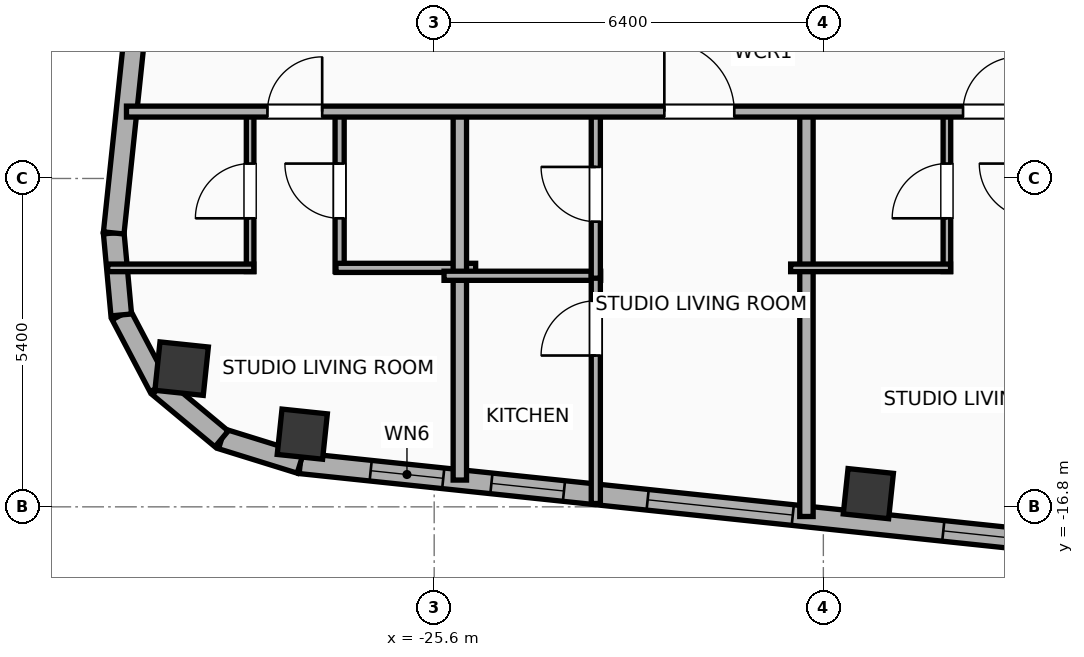
"""IFC4 building model, lengths in metres.
Left out: names, types, materials, properties, quantities, classifications, styles, units other than length and angle.
Written with IfcOpenShell. Run it as: python <this file> out.ifc"""

import sys

from ifc_helpers import new_model, si_unit, direction, frame, frame_2d, origin, origin_2d, place, context, subcontext, project, spatial, rectangle, hollow_rectangle, hollow_circle, extrude, element, fill, save


model = new_model("IFC4")
c1 = context("Model", 3, precision=1e-05, world=origin(), true_north=direction((0.0, 1.0)))
c2 = subcontext(c1, "Body", "Model", "MODEL_VIEW")
j1 = project(units=[si_unit("LENGTHUNIT", "METRE"), si_unit("PLANEANGLEUNIT", "RADIAN")], contexts=[c1])
p1 = place(None, origin())
s1 = spatial("IfcSite", under=j1, at=p1, CompositionType="ELEMENT")
p2 = place(p1, origin())
s2 = spatial("IfcBuilding", under=s1, at=p2, CompositionType="ELEMENT")
p3 = place(p2, frame((0.0, 0.0, 267.8)))
s3 = spatial("IfcBuildingStorey", under=s2, at=p3, CompositionType="ELEMENT", Elevation=267.8)
for number, where, z_axis, x_axis in (
    (1, (-27.769, -15.604, 0.0), (0.0, 0.0, 1.0), (0.995, -0.105, 0.0)),
    (2, (-18.46, -16.583, 0.0), (0.0, 0.0, 1.0), (0.995, -0.105, 0.0)),
):
    element("IfcColumn", number, at=place(p3, frame(where, z_axis=z_axis, x_axis=x_axis)), inside=s3, PredefinedType="COLUMN", context=c2, shape_type="SweptSolid", body=[
        extrude(hollow_rectangle(XDim=0.75, YDim=0.75, WallThickness=0.025, at=origin_2d()), origin(), (0.0, 0.0, 1.0), 3.9),
    ])
p4 = place(p3, frame((-29.753, -14.527, 0.0), z_axis=(0.0, 0.0, 1.0), x_axis=(0.994521895368, -0.104528463268, 0.0)))
e3 = element("IfcColumn", 3, at=p4, inside=s3, PredefinedType="COLUMN", context=c2, shape_type="SweptSolid", body=[
    extrude(hollow_circle(Radius=0.4, WallThickness=0.028, at=origin_2d()), origin(), (0.0, 0.0, 1.0), 3.9),
])
p5 = place(p3, frame((18.708, -20.972, 0.0), z_axis=(0.0, 0.0, 1.0), x_axis=(-0.994521888554, 0.104528528102, 0.0)))
e4 = element("IfcWall", 4, at=p5, inside=s3, PredefinedType="ELEMENTEDWALL", context=c2, shape_type="SweptSolid", body=[
    extrude(rectangle(XDim=46.766, YDim=0.34, at=frame_2d((23.383, 0.0))), origin(), (0.0, 0.0, 1.0), 3.65),
])
p6 = place(p5, frame((23.833, 0.0, 0.75)))
e5 = element("IfcOpeningElement", 5, at=p6, cuts=e4, PredefinedType="OPENING", context=c2, shape_type="SweptSolid", body=[
    extrude(rectangle(XDim=2.4, YDim=2.1, at=frame_2d((1.2, 1.05))), frame((0.0, 0.18, 0.0), z_axis=(0.0, -1.0, 0.0), x_axis=(1.0, 0.0, 0.0)), (0.0, 0.0, 1.0), 0.36),
])
p7 = place(p5, frame((38.622, 0.0, 0.75)))
e6 = element("IfcOpeningElement", 6, at=p7, cuts=e4, PredefinedType="OPENING", context=c2, shape_type="SweptSolid", body=[
    extrude(rectangle(XDim=2.4, YDim=2.1, at=frame_2d((1.2, 1.05))), frame((0.0, 0.18, 0.0), z_axis=(0.0, -1.0, 0.0), x_axis=(1.0, 0.0, 0.0)), (0.0, 0.0, 1.0), 0.36),
])
p8 = place(p5, frame((44.402, 0.0, 0.75)))
e7 = element("IfcOpeningElement", 7, at=p8, cuts=e4, PredefinedType="OPENING", context=c2, shape_type="SweptSolid", body=[
    extrude(rectangle(XDim=1.2, YDim=2.05, at=frame_2d((0.6, 1.025))), frame((0.0, 0.18, 0.0), z_axis=(0.0, -1.0, 0.0), x_axis=(1.0, 0.0, 0.0)), (0.0, 0.0, 1.0), 0.36),
])
p9 = place(p5, frame((42.406, 0.0, 0.75)))
e8 = element("IfcOpeningElement", 8, at=p9, cuts=e4, PredefinedType="OPENING", context=c2, shape_type="SweptSolid", body=[
    extrude(rectangle(XDim=1.2, YDim=2.05, at=frame_2d((0.6, 1.025))), frame((0.0, 0.18, 0.0), z_axis=(0.0, -1.0, 0.0), x_axis=(1.0, 0.0, 0.0)), (0.0, 0.0, 1.0), 0.36),
])
p10 = place(p5, frame((34.933, 0.0, 0.75)))
e9 = element("IfcOpeningElement", 9, at=p10, cuts=e4, PredefinedType="OPENING", context=c2, shape_type="SweptSolid", body=[
    extrude(rectangle(XDim=1.2, YDim=2.05, at=frame_2d((0.6, 1.025))), frame((0.0, 0.18, 0.0), z_axis=(0.0, -1.0, 0.0), x_axis=(1.0, 0.0, 0.0)), (0.0, 0.0, 1.0), 0.36),
])
p11 = place(p5, frame((28.631, 0.0, 0.75)))
e10 = element("IfcOpeningElement", 10, at=p11, cuts=e4, PredefinedType="OPENING", context=c2, shape_type="SweptSolid", body=[
    extrude(rectangle(XDim=1.2, YDim=2.05, at=frame_2d((0.6, 1.025))), frame((0.0, 0.18, 0.0), z_axis=(0.0, -1.0, 0.0), x_axis=(1.0, 0.0, 0.0)), (0.0, 0.0, 1.0), 0.36),
])
p12 = place(p5, frame((30.896, 0.0, 0.75)))
e11 = element("IfcOpeningElement", 11, at=p12, cuts=e4, PredefinedType="OPENING", context=c2, shape_type="SweptSolid", body=[
    extrude(rectangle(XDim=1.2, YDim=2.05, at=frame_2d((0.6, 1.025))), frame((0.0, 0.18, 0.0), z_axis=(0.0, -1.0, 0.0), x_axis=(1.0, 0.0, 0.0)), (0.0, 0.0, 1.0), 0.36),
])
p13 = place(p5, frame((7.497, 0.0, 0.75)))
e12 = element("IfcOpeningElement", 12, at=p13, cuts=e4, PredefinedType="OPENING", context=c2, shape_type="SweptSolid", body=[
    extrude(rectangle(XDim=1.2, YDim=2.05, at=frame_2d((0.6, 1.025))), frame((0.0, 0.18, 0.0), z_axis=(0.0, -1.0, 0.0), x_axis=(1.0, 0.0, 0.0)), (0.0, 0.0, 1.0), 0.36),
])
p14 = place(p5, frame((4.151, 0.0, 0.75)))
e13 = element("IfcOpeningElement", 13, at=p14, cuts=e4, PredefinedType="OPENING", context=c2, shape_type="SweptSolid", body=[
    extrude(rectangle(XDim=1.2, YDim=2.05, at=frame_2d((0.6, 1.025))), frame((0.0, 0.18, 0.0), z_axis=(0.0, -1.0, 0.0), x_axis=(1.0, 0.0, 0.0)), (0.0, 0.0, 1.0), 0.36),
])
p15 = place(p5, frame((1.365, 0.0, 0.75)))
e14 = element("IfcOpeningElement", 14, at=p15, cuts=e4, PredefinedType="OPENING", context=c2, shape_type="SweptSolid", body=[
    extrude(rectangle(XDim=1.2, YDim=2.05, at=frame_2d((0.6, 1.025))), frame((0.0, 0.18, 0.0), z_axis=(0.0, -1.0, 0.0), x_axis=(1.0, 0.0, 0.0)), (0.0, 0.0, 1.0), 0.36),
])
p16 = place(p5, frame((20.254, 0.0, 0.75)))
e15 = element("IfcOpeningElement", 15, at=p16, cuts=e4, PredefinedType="OPENING", context=c2, shape_type="SweptSolid", body=[
    extrude(rectangle(XDim=1.2, YDim=2.05, at=frame_2d((0.6, 1.025))), frame((0.0, 0.18, 0.0), z_axis=(0.0, -1.0, 0.0), x_axis=(1.0, 0.0, 0.0)), (0.0, 0.0, 1.0), 0.36),
])
p17 = place(p5, frame((16.172, 0.0, 0.75)))
e16 = element("IfcOpeningElement", 16, at=p17, cuts=e4, PredefinedType="OPENING", context=c2, shape_type="SweptSolid", body=[
    extrude(rectangle(XDim=1.2, YDim=2.05, at=frame_2d((0.6, 1.025))), frame((0.0, 0.18, 0.0), z_axis=(0.0, -1.0, 0.0), x_axis=(1.0, 0.0, 0.0)), (0.0, 0.0, 1.0), 0.36),
])
p18 = place(p5, frame((12.11, 0.0, 0.75)))
e17 = element("IfcOpeningElement", 17, at=p18, cuts=e4, PredefinedType="OPENING", context=c2, shape_type="SweptSolid", body=[
    extrude(rectangle(XDim=1.2, YDim=2.05, at=frame_2d((0.6, 1.025))), frame((0.0, 0.18, 0.0), z_axis=(0.0, -1.0, 0.0), x_axis=(1.0, 0.0, 0.0)), (0.0, 0.0, 1.0), 0.36),
])
p19 = place(p3, frame((-27.802, -16.084, 0.0), z_axis=(0.0, 0.0, 1.0), x_axis=(-0.955007802701, 0.296580674994, 0.0)))
e18 = element("IfcWall", 18, at=p19, inside=s3, PredefinedType="ELEMENTEDWALL", context=c2, shape_type="SweptSolid", body=[
    extrude(rectangle(XDim=1.354, YDim=0.34, at=frame_2d((0.677, 0.0))), origin(), (0.0, 0.0, 1.0), 3.65),
])
p20 = place(p3, frame((-29.096, -15.682, 0.0), z_axis=(0.0, 0.0, 1.0), x_axis=(-0.768864427906, 0.639411832469, 0.0)))
e19 = element("IfcWall", 19, at=p20, inside=s3, PredefinedType="ELEMENTEDWALL", context=c2, shape_type="SweptSolid", body=[
    extrude(rectangle(XDim=1.337, YDim=0.34, at=frame_2d((0.668, 0.0))), origin(), (0.0, 0.0, 1.0), 3.65),
])
p21 = place(p3, frame((-30.124, -14.827, 0.0), z_axis=(0.0, 0.0, 1.0), x_axis=(-0.465528132217, 0.885033083062, 0.0)))
e20 = element("IfcWall", 20, at=p21, inside=s3, PredefinedType="ELEMENTEDWALL", context=c2, shape_type="SweptSolid", body=[
    extrude(rectangle(XDim=1.337, YDim=0.34, at=frame_2d((0.668, 0.0))), origin(), (0.0, 0.0, 1.0), 3.65),
])
p22 = place(p3, frame((-30.746, -13.644, 0.0), z_axis=(0.0, 0.0, 1.0), x_axis=(-0.091592370975, 0.995796584438, 0.0)))
e21 = element("IfcWall", 21, at=p22, inside=s3, PredefinedType="ELEMENTEDWALL", context=c2, shape_type="SweptSolid", body=[
    extrude(rectangle(XDim=1.354, YDim=0.34, at=frame_2d((0.677, 0.0))), origin(), (0.0, 0.0, 1.0), 3.65),
])
p23 = place(p3, frame((-30.87, -12.296, 0.0), z_axis=(0.0, 0.0, 1.0), x_axis=(0.104533282919, 0.994521388791, 0.0)))
e22 = element("IfcWall", 22, at=p23, inside=s3, PredefinedType="ELEMENTEDWALL", context=c2, shape_type="SweptSolid", body=[
    extrude(rectangle(XDim=30.366, YDim=0.34, at=frame_2d((15.183, 0.0))), origin(), (0.0, 0.0, 1.0), 3.65),
])
p24 = place(p23, frame((5.842, 0.0, 0.75)))
e23 = element("IfcOpeningElement", 23, at=p24, cuts=e22, PredefinedType="OPENING", context=c2, shape_type="SweptSolid", body=[
    extrude(rectangle(XDim=1.8, YDim=2.1, at=frame_2d((0.9, 1.05))), frame((0.0, 0.18, 0.0), z_axis=(0.0, -1.0, 0.0), x_axis=(1.0, 0.0, 0.0)), (0.0, 0.0, 1.0), 0.36),
])
p25 = place(p23, frame((23.525, 0.0, 0.75)))
e24 = element("IfcOpeningElement", 24, at=p25, cuts=e22, PredefinedType="OPENING", context=c2, shape_type="SweptSolid", body=[
    extrude(rectangle(XDim=1.8, YDim=2.1, at=frame_2d((0.9, 1.05))), frame((0.0, 0.18, 0.0), z_axis=(0.0, -1.0, 0.0), x_axis=(1.0, 0.0, 0.0)), (0.0, 0.0, 1.0), 0.36),
])
p26 = place(p23, frame((27.117, 0.0, 0.75)))
e25 = element("IfcOpeningElement", 25, at=p26, cuts=e22, PredefinedType="OPENING", context=c2, shape_type="SweptSolid", body=[
    extrude(rectangle(XDim=1.2, YDim=2.05, at=frame_2d((0.6, 1.025))), frame((0.0, 0.18, 0.0), z_axis=(0.0, -1.0, 0.0), x_axis=(1.0, 0.0, 0.0)), (0.0, 0.0, 1.0), 0.36),
])
p27 = place(p23, frame((16.235, 0.0, 0.75)))
e26 = element("IfcOpeningElement", 26, at=p27, cuts=e22, PredefinedType="OPENING", context=c2, shape_type="SweptSolid", body=[
    extrude(rectangle(XDim=1.2, YDim=2.05, at=frame_2d((0.6, 1.025))), frame((0.0, 0.18, 0.0), z_axis=(0.0, -1.0, 0.0), x_axis=(1.0, 0.0, 0.0)), (0.0, 0.0, 1.0), 0.36),
])
p28 = place(p3, frame((-28.627, -12.93, 0.0), z_axis=(0.0, 0.0, 1.0), x_axis=(0.0, 1.0, 0.0)))
e27 = element("IfcWall", 27, at=p28, inside=s3, PredefinedType="PARTITIONING", context=c2, shape_type="SweptSolid", body=[
    extrude(rectangle(XDim=2.65, YDim=0.125, at=frame_2d((1.325, 0.0))), origin(), (0.0, 0.0, 1.0), 3.65),
])
p29 = place(p28, frame((0.875, 0.0, 0.0)))
e28 = element("IfcOpeningElement", 28, at=p29, cuts=e27, PredefinedType="OPENING", context=c2, shape_type="SweptSolid", body=[
    extrude(rectangle(XDim=0.9, YDim=2.05, at=frame_2d((0.45, 1.025))), frame((0.0, 0.073, 0.0), z_axis=(0.0, -1.0, 0.0), x_axis=(1.0, 0.0, 0.0)), (0.0, 0.0, 1.0), 0.145),
])
p30 = place(p3, frame((-27.155, -12.93, 0.0), z_axis=(0.0, 0.0, 1.0), x_axis=(0.0, 1.0, 0.0)))
e29 = element("IfcWall", 29, at=p30, inside=s3, PredefinedType="PLUMBINGWALL", context=c2, shape_type="SweptSolid", body=[
    extrude(rectangle(XDim=2.65, YDim=0.15, at=frame_2d((1.325, 0.0))), origin(), (0.0, 0.0, 1.0), 3.65),
])
p31 = place(p30, frame((0.875, 0.0, 0.0)))
e30 = element("IfcOpeningElement", 30, at=p31, cuts=e29, PredefinedType="OPENING", context=c2, shape_type="SweptSolid", body=[
    extrude(rectangle(XDim=0.9, YDim=2.05, at=frame_2d((0.45, 1.025))), frame((0.0, 0.085, 0.0), z_axis=(0.0, -1.0, 0.0), x_axis=(1.0, 0.0, 0.0)), (0.0, 0.0, 1.0), 0.17),
])
p32 = place(p3, frame((-30.968, -12.87, 0.0), z_axis=(0.0, 0.0, 1.0), x_axis=(1.0, 0.0, 0.0)))
e31 = element("IfcWall", 31, at=p32, inside=s3, PredefinedType="PARTITIONING", context=c2, shape_type="SweptSolid", body=[
    extrude(rectangle(XDim=2.401, YDim=0.125, at=frame_2d((1.201, 0.0))), origin(), (0.0, 0.0, 1.0), 3.65),
])
p33 = place(p3, frame((-27.215, -12.87, 0.0), z_axis=(0.0, 0.0, 1.0), x_axis=(1.0, 0.0, 0.0)))
e32 = element("IfcWall", 32, at=p33, inside=s3, PredefinedType="PLUMBINGWALL", context=c2, shape_type="SweptSolid", body=[
    extrude(rectangle(XDim=2.297, YDim=0.15, at=frame_2d((1.148, 0.0))), origin(), (0.0, 0.0, 1.0), 3.65),
])
p34 = place(p3, frame((-25.178, -16.36, 0.0), z_axis=(0.0, 0.0, 1.0), x_axis=(0.0, 1.0, 0.0)))
e33 = element("IfcWall", 33, at=p34, inside=s3, PredefinedType="PARTITIONING", context=c2, shape_type="SweptSolid", body=[
    extrude(rectangle(XDim=6.14, YDim=0.22, at=frame_2d((3.07, 0.0))), origin(), (0.0, 0.0, 1.0), 3.65),
])
p35 = place(p3, frame((-25.438, -13.0, 0.0), z_axis=(0.0, 0.0, 1.0), x_axis=(1.0, 0.0, 0.0)))
e34 = element("IfcWall", 34, at=p35, inside=s3, PredefinedType="PLUMBINGWALL", context=c2, shape_type="SweptSolid", body=[
    extrude(rectangle(XDim=2.576, YDim=0.15, at=frame_2d((1.288, 0.0))), origin(), (0.0, 0.0, 1.0), 3.65),
])
p36 = place(p3, frame((-22.942, -16.745, 0.0), z_axis=(0.0, 0.0, 1.0), x_axis=(0.0, 1.0, 0.0)))
e35 = element("IfcWall", 35, at=p36, inside=s3, PredefinedType="PLUMBINGWALL", context=c2, shape_type="SweptSolid", body=[
    extrude(rectangle(XDim=3.785, YDim=0.15, at=frame_2d((1.893, 0.0))), origin(), (0.0, 0.0, 1.0), 3.65),
])
p37 = place(p36, frame((2.434, 0.0, 0.0)))
e36 = element("IfcOpeningElement", 36, at=p37, cuts=e35, PredefinedType="OPENING", context=c2, shape_type="SweptSolid", body=[
    extrude(rectangle(XDim=0.9, YDim=2.05, at=frame_2d((0.45, 1.025))), frame((0.0, 0.085, 0.0), z_axis=(0.0, -1.0, 0.0), x_axis=(1.0, 0.0, 0.0)), (0.0, 0.0, 1.0), 0.17),
])
p38 = place(p3, frame((-22.942, -13.04, 0.0), z_axis=(0.0, 0.0, 1.0), x_axis=(0.0, 1.0, 0.0)))
e37 = element("IfcWall", 37, at=p38, inside=s3, PredefinedType="PLUMBINGWALL", context=c2, shape_type="SweptSolid", body=[
    extrude(rectangle(XDim=2.76, YDim=0.15, at=frame_2d((1.38, 0.0))), origin(), (0.0, 0.0, 1.0), 3.65),
])
p39 = place(p38, frame((0.93, 0.0, 0.0)))
e38 = element("IfcOpeningElement", 38, at=p39, cuts=e37, PredefinedType="OPENING", context=c2, shape_type="SweptSolid", body=[
    extrude(rectangle(XDim=0.9, YDim=2.05, at=frame_2d((0.45, 1.025))), frame((0.0, 0.085, 0.0), z_axis=(0.0, -1.0, 0.0), x_axis=(1.0, 0.0, 0.0)), (0.0, 0.0, 1.0), 0.17),
])
p40 = place(p3, frame((-19.478, -16.959, 0.0), z_axis=(0.0, 0.0, 1.0), x_axis=(0.0, 1.0, 0.0)))
e39 = element("IfcWall", 39, at=p40, inside=s3, PredefinedType="PARTITIONING", context=c2, shape_type="SweptSolid", body=[
    extrude(rectangle(XDim=6.739, YDim=0.22, at=frame_2d((3.369, 0.0))), origin(), (0.0, 0.0, 1.0), 3.65),
])
p41 = place(p3, frame((-17.168, -12.93, 0.0), z_axis=(0.0, 0.0, 1.0), x_axis=(0.0, 1.0, 0.0)))
e40 = element("IfcWall", 40, at=p41, inside=s3, PredefinedType="PARTITIONING", context=c2, shape_type="SweptSolid", body=[
    extrude(rectangle(XDim=2.65, YDim=0.125, at=frame_2d((1.325, 0.0))), origin(), (0.0, 0.0, 1.0), 3.65),
])
p42 = place(p41, frame((0.875, 0.0, 0.0)))
e41 = element("IfcOpeningElement", 41, at=p42, cuts=e40, PredefinedType="OPENING", context=c2, shape_type="SweptSolid", body=[
    extrude(rectangle(XDim=0.9, YDim=2.05, at=frame_2d((0.45, 1.025))), frame((0.0, 0.073, 0.0), z_axis=(0.0, -1.0, 0.0), x_axis=(1.0, 0.0, 0.0)), (0.0, 0.0, 1.0), 0.145),
])
p43 = place(p3, frame((-19.738, -12.87, 0.0), z_axis=(0.0, 0.0, 1.0), x_axis=(1.0, 0.0, 0.0)))
e42 = element("IfcWall", 42, at=p43, inside=s3, PredefinedType="PARTITIONING", context=c2, shape_type="SweptSolid", body=[
    extrude(rectangle(XDim=2.63, YDim=0.125, at=frame_2d((1.315, 0.0))), origin(), (0.0, 0.0, 1.0), 3.65),
])
p44 = place(p3, frame((-30.66, -10.3, 0.0), z_axis=(0.0, 0.0, 1.0), x_axis=(1.0, 0.0, 0.0)))
e43 = element("IfcWall", 43, at=p44, inside=s3, PredefinedType="PARTITIONING", context=c2, shape_type="SweptSolid", body=[
    extrude(rectangle(XDim=22.58, YDim=0.18, at=frame_2d((11.29, 0.0))), origin(), (0.0, 0.0, 1.0), 3.65),
])
p45 = place(p44, frame((2.318, 0.0, 0.0)))
e44 = element("IfcOpeningElement", 44, at=p45, cuts=e43, PredefinedType="OPENING", context=c2, shape_type="SweptSolid", body=[
    extrude(rectangle(XDim=0.9, YDim=2.05, at=frame_2d((0.45, 1.025))), frame((0.0, 0.1, 0.0), z_axis=(0.0, -1.0, 0.0), x_axis=(1.0, 0.0, 0.0)), (0.0, 0.0, 1.0), 0.2),
])
p46 = place(p44, frame((8.845, 0.0, 0.0)))
e45 = element("IfcOpeningElement", 45, at=p46, cuts=e43, PredefinedType="OPENING", context=c2, shape_type="SweptSolid", body=[
    extrude(rectangle(XDim=1.15, YDim=2.05, at=frame_2d((0.575, 1.025))), frame((0.0, 0.1, 0.0), z_axis=(0.0, -1.0, 0.0), x_axis=(1.0, 0.0, 0.0)), (0.0, 0.0, 1.0), 0.2),
])
p47 = place(p44, frame((13.758, 0.0, 0.0)))
e46 = element("IfcOpeningElement", 46, at=p47, cuts=e43, PredefinedType="OPENING", context=c2, shape_type="SweptSolid", body=[
    extrude(rectangle(XDim=0.9, YDim=2.05, at=frame_2d((0.45, 1.025))), frame((0.0, 0.1, 0.0), z_axis=(0.0, -1.0, 0.0), x_axis=(1.0, 0.0, 0.0)), (0.0, 0.0, 1.0), 0.2),
])
p48 = place(p44, frame((20.292, 0.0, 0.0)))
e47 = element("IfcOpeningElement", 47, at=p48, cuts=e43, PredefinedType="OPENING", context=c2, shape_type="SweptSolid", body=[
    extrude(rectangle(XDim=1.15, YDim=2.05, at=frame_2d((0.575, 1.025))), frame((0.0, 0.1, 0.0), z_axis=(0.0, -1.0, 0.0), x_axis=(1.0, 0.0, 0.0)), (0.0, 0.0, 1.0), 0.2),
])
p49 = place(p7, origin())
e48 = element("IfcWindow", 48, at=p49, inside=s3, PartitioningType="SINGLE_PANEL", PredefinedType="WINDOW", context=c2, shape_type="SweptSolid", body=[
    extrude(rectangle(XDim=2.4, YDim=2.1, at=frame_2d((1.2, 1.05))), frame((0.0, 0.03, 0.0), z_axis=(0.0, -1.0, 0.0), x_axis=(1.0, 0.0, 0.0)), (0.0, 0.0, 1.0), 0.06),
])
fill(e6, e48)
p50 = place(p8, origin())
e49 = element("IfcWindow", 49, at=p50, inside=s3, PartitioningType="SINGLE_PANEL", PredefinedType="WINDOW", context=c2, shape_type="SweptSolid", body=[
    extrude(rectangle(XDim=1.2, YDim=2.05, at=frame_2d((0.6, 1.025))), frame((0.0, 0.03, 0.0), z_axis=(0.0, -1.0, 0.0), x_axis=(1.0, 0.0, 0.0)), (0.0, 0.0, 1.0), 0.06),
])
fill(e7, e49)
p51 = place(p9, origin())
e50 = element("IfcWindow", 50, at=p51, inside=s3, PartitioningType="SINGLE_PANEL", PredefinedType="WINDOW", context=c2, shape_type="SweptSolid", body=[
    extrude(rectangle(XDim=1.2, YDim=2.05, at=frame_2d((0.6, 1.025))), frame((0.0, 0.03, 0.0), z_axis=(0.0, -1.0, 0.0), x_axis=(1.0, 0.0, 0.0)), (0.0, 0.0, 1.0), 0.06),
])
fill(e8, e50)
p52 = place(p10, origin())
e51 = element("IfcWindow", 51, at=p52, inside=s3, PartitioningType="SINGLE_PANEL", PredefinedType="WINDOW", context=c2, shape_type="SweptSolid", body=[
    extrude(rectangle(XDim=1.2, YDim=2.05, at=frame_2d((0.6, 1.025))), frame((0.0, 0.03, 0.0), z_axis=(0.0, -1.0, 0.0), x_axis=(1.0, 0.0, 0.0)), (0.0, 0.0, 1.0), 0.06),
])
fill(e9, e51)
p53 = place(p29, origin())
e52 = element("IfcDoor", 52, at=p53, inside=s3, OperationType="SINGLE_SWING_LEFT", PredefinedType="DOOR", context=c2, shape_type="SweptSolid", body=[
    extrude(rectangle(XDim=0.9, YDim=2.05, at=frame_2d((0.45, 1.025))), frame((0.0, 0.025, 0.0), z_axis=(0.0, -1.0, 0.0), x_axis=(1.0, 0.0, 0.0)), (0.0, 0.0, 1.0), 0.05),
])
fill(e28, e52)
p54 = place(p31, origin())
e53 = element("IfcDoor", 53, at=p54, inside=s3, OperationType="SINGLE_SWING_RIGHT", PredefinedType="DOOR", context=c2, shape_type="SweptSolid", body=[
    extrude(rectangle(XDim=0.9, YDim=2.05, at=frame_2d((0.45, 1.025))), frame((0.0, 0.025, 0.0), z_axis=(0.0, -1.0, 0.0), x_axis=(1.0, 0.0, 0.0)), (0.0, 0.0, 1.0), 0.05),
])
fill(e30, e53)
p55 = place(p37, origin())
e54 = element("IfcDoor", 54, at=p55, inside=s3, OperationType="SINGLE_SWING_LEFT", PredefinedType="DOOR", context=c2, shape_type="SweptSolid", body=[
    extrude(rectangle(XDim=0.9, YDim=2.05, at=frame_2d((0.45, 1.025))), frame((0.0, 0.025, 0.0), z_axis=(0.0, -1.0, 0.0), x_axis=(1.0, 0.0, 0.0)), (0.0, 0.0, 1.0), 0.05),
])
fill(e36, e54)
p56 = place(p39, origin())
e55 = element("IfcDoor", 55, at=p56, inside=s3, OperationType="SINGLE_SWING_RIGHT", PredefinedType="DOOR", context=c2, shape_type="SweptSolid", body=[
    extrude(rectangle(XDim=0.9, YDim=2.05, at=frame_2d((0.45, 1.025))), frame((0.0, 0.025, 0.0), z_axis=(0.0, -1.0, 0.0), x_axis=(1.0, 0.0, 0.0)), (0.0, 0.0, 1.0), 0.05),
])
fill(e38, e55)
p57 = place(p42, origin())
e56 = element("IfcDoor", 56, at=p57, inside=s3, OperationType="SINGLE_SWING_LEFT", PredefinedType="DOOR", context=c2, shape_type="SweptSolid", body=[
    extrude(rectangle(XDim=0.9, YDim=2.05, at=frame_2d((0.45, 1.025))), frame((0.0, 0.025, 0.0), z_axis=(0.0, -1.0, 0.0), x_axis=(1.0, 0.0, 0.0)), (0.0, 0.0, 1.0), 0.05),
])
fill(e41, e56)
p58 = place(p45, origin())
e57 = element("IfcDoor", 57, at=p58, inside=s3, OperationType="SINGLE_SWING_RIGHT", PredefinedType="DOOR", context=c2, shape_type="SweptSolid", body=[
    extrude(rectangle(XDim=0.9, YDim=2.05, at=frame_2d((0.45, 1.025))), frame((0.0, 0.025, 0.0), z_axis=(0.0, -1.0, 0.0), x_axis=(1.0, 0.0, 0.0)), (0.0, 0.0, 1.0), 0.05),
])
fill(e44, e57)
p59 = place(p46, origin())
e58 = element("IfcDoor", 58, at=p59, inside=s3, OperationType="SINGLE_SWING_LEFT", PredefinedType="DOOR", context=c2, shape_type="SweptSolid", body=[
    extrude(rectangle(XDim=1.15, YDim=2.05, at=frame_2d((0.575, 1.025))), frame((0.0, 0.025, 0.0), z_axis=(0.0, -1.0, 0.0), x_axis=(1.0, 0.0, 0.0)), (0.0, 0.0, 1.0), 0.05),
])
fill(e45, e58)
p60 = place(p47, origin())
e59 = element("IfcDoor", 59, at=p60, inside=s3, OperationType="SINGLE_SWING_RIGHT", PredefinedType="DOOR", context=c2, shape_type="SweptSolid", body=[
    extrude(rectangle(XDim=0.9, YDim=2.05, at=frame_2d((0.45, 1.025))), frame((0.0, 0.025, 0.0), z_axis=(0.0, -1.0, 0.0), x_axis=(1.0, 0.0, 0.0)), (0.0, 0.0, 1.0), 0.05),
])
fill(e46, e59)
save(model, sys.argv[1])
